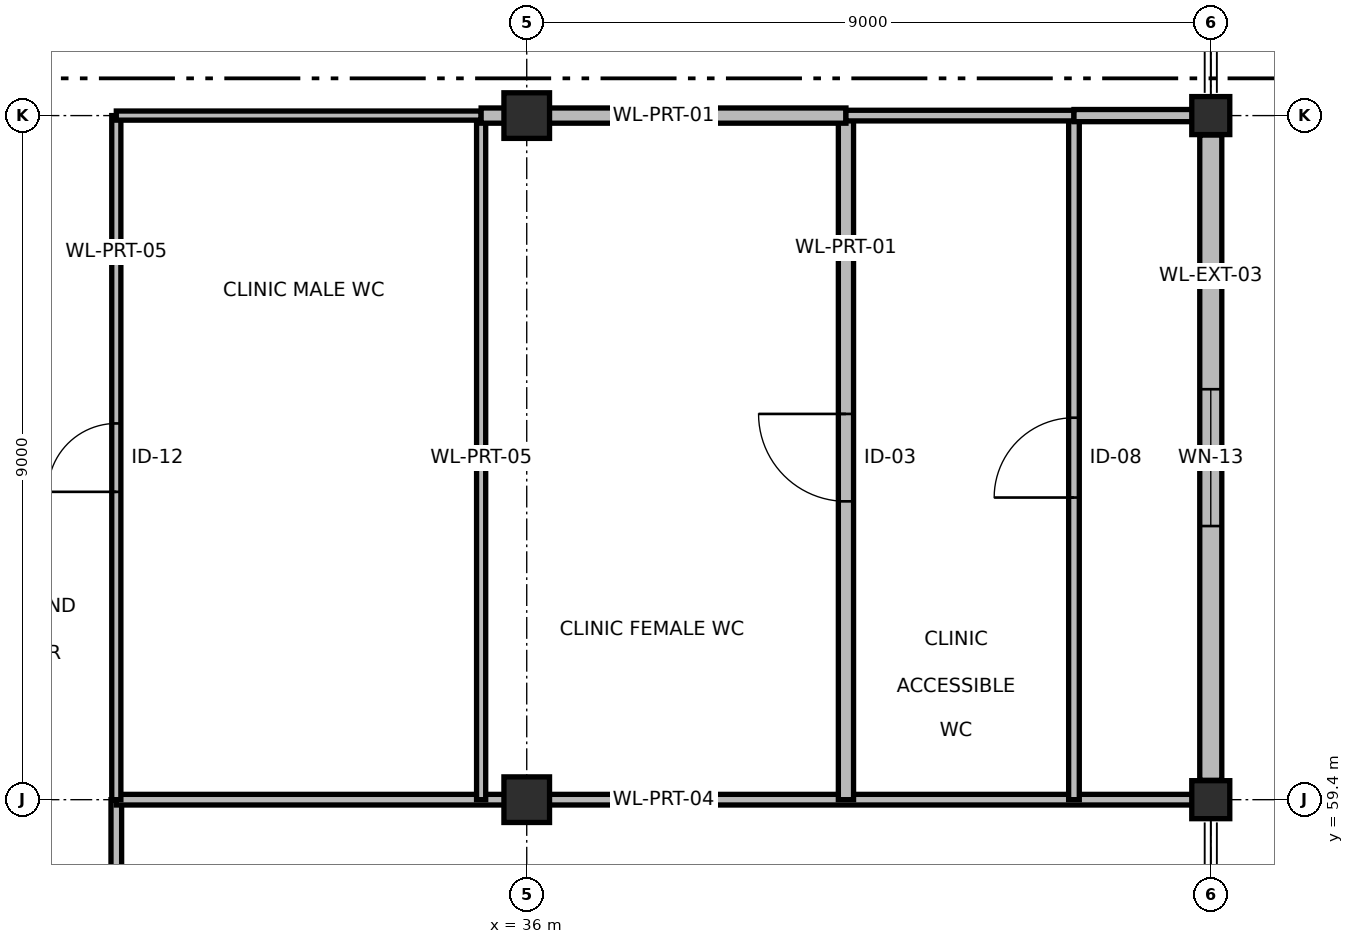
"""IFC4 building model, lengths in metres.
Left out: names, types, materials, properties, quantities, classifications, styles, units other than length and angle.
Written with IfcOpenShell. Run it as: python <this file> out.ifc"""

import sys

from ifc_helpers import new_model, si_unit, direction, frame, frame_2d, origin, origin_2d, place, context, subcontext, project, spatial, rectangle, extrude, element, fill, save


model = new_model("IFC4")
c1 = context("Model", 3, precision=1e-05, world=origin(), true_north=direction((0.0, 1.0)))
c2 = subcontext(c1, "Body", "Model", "MODEL_VIEW")
j1 = project(units=[si_unit("LENGTHUNIT", "METRE"), si_unit("PLANEANGLEUNIT", "RADIAN")], contexts=[c1])
p1 = place(None, origin())
s1 = spatial("IfcSite", under=j1, at=p1, CompositionType="ELEMENT")
p2 = place(p1, origin())
s2 = spatial("IfcBuilding", under=s1, at=p2, CompositionType="ELEMENT")
p3 = place(p2, origin())
s3 = spatial("IfcBuildingStorey", under=s2, at=p3, CompositionType="ELEMENT", Elevation=0.0)
for number, where, z_axis, x_axis in (
    (1, (36.0, 59.4, 0.0), (0.0, 0.0, 1.0), (1.0, 0.0, 0.0)),
    (2, (36.0, 68.4, 0.0), (0.0, 0.0, 1.0), (1.0, 0.0, 0.0)),
):
    element("IfcColumn", number, at=place(p3, frame(where, z_axis=z_axis, x_axis=x_axis)), inside=s3, PredefinedType="COLUMN", context=c2, shape_type="SweptSolid", body=[
        extrude(rectangle(XDim=0.6, YDim=0.6, at=origin_2d()), origin(), (0.0, 0.0, 1.0), 4.8),
    ])
for number, where, z_axis, x_axis in (
    (3, (45.0, 59.4, 0.0), (0.0, 0.0, 1.0), (1.0, 0.0, 0.0)),
    (4, (45.0, 68.4, 0.0), (0.0, 0.0, 1.0), (1.0, 0.0, 0.0)),
):
    element("IfcColumn", number, at=place(p3, frame(where, z_axis=z_axis, x_axis=x_axis)), inside=s3, PredefinedType="COLUMN", context=c2, shape_type="SweptSolid", body=[
        extrude(rectangle(XDim=0.5, YDim=0.5, at=origin_2d()), origin(), (0.0, 0.0, 1.0), 4.8),
    ])
p4 = place(p3, frame((45.0, 68.145, 0.0), z_axis=(0.0, 0.0, 1.0), x_axis=(0.0, -1.0, 0.0)))
e5 = element("IfcWall", 5, at=p4, inside=s3, PredefinedType="SOLIDWALL", context=c2, shape_type="SweptSolid", body=[
    extrude(rectangle(XDim=8.49, YDim=0.29, at=frame_2d((4.245, 0.0))), origin(), (0.0, 0.0, 1.0), 3.785),
])
p5 = place(p4, frame((3.345, 0.0, 0.95)))
e6 = element("IfcOpeningElement", 6, at=p5, cuts=e5, PredefinedType="OPENING", context=c2, shape_type="SweptSolid", body=[
    extrude(rectangle(XDim=1.8, YDim=1.5, at=frame_2d((0.9, 0.75))), frame((0.0, 0.155, 0.0), z_axis=(0.0, -1.0, 0.0), x_axis=(1.0, 0.0, 0.0)), (0.0, 0.0, 1.0), 0.31),
])
p6 = place(p3, frame((30.6, 40.8, 0.0), z_axis=(0.0, 0.0, 1.0), x_axis=(0.0, 1.0, 0.0)))
e7 = element("IfcWall", 7, at=p6, inside=s3, PredefinedType="PARTITIONING", context=c2, shape_type="SweptSolid", body=[
    extrude(rectangle(XDim=18.6, YDim=0.14, at=frame_2d((9.3, 0.0))), origin(), (0.0, 0.0, 1.0), 3.835),
])
p7 = place(p6, frame((12.917, 0.0, 0.0)))
e8 = element("IfcOpeningElement", 8, at=p7, cuts=e7, PredefinedType="OPENING", context=c2, shape_type="SweptSolid", body=[
    extrude(rectangle(XDim=0.95, YDim=2.1, at=frame_2d((0.475, 1.05))), frame((0.0, 0.08, 0.0), z_axis=(0.0, -1.0, 0.0), x_axis=(1.0, 0.0, 0.0)), (0.0, 0.0, 1.0), 0.16),
])
p8 = place(p3, frame((30.6, 59.4, 0.0), z_axis=(0.0, 0.0, 1.0), x_axis=(1.0, 0.0, 0.0)))
e9 = element("IfcWall", 9, at=p8, inside=s3, PredefinedType="PARTITIONING", context=c2, shape_type="SweptSolid", body=[
    extrude(rectangle(XDim=14.4, YDim=0.14, at=frame_2d((7.2, 0.0))), origin(), (0.0, 0.0, 1.0), 3.735),
])
p9 = place(p3, frame((30.6, 59.4, 0.0), z_axis=(0.0, 0.0, 1.0), x_axis=(0.0, 1.0, 0.0)))
e10 = element("IfcWall", 10, at=p9, inside=s3, PredefinedType="PARTITIONING", context=c2, shape_type="SweptSolid", body=[
    extrude(rectangle(XDim=9.0, YDim=0.12, at=frame_2d((4.5, 0.0))), origin(), (0.0, 0.0, 1.0), 3.835),
])
p10 = place(p9, frame((4.05, 0.0, 0.0)))
e11 = element("IfcOpeningElement", 11, at=p10, cuts=e10, PredefinedType="OPENING", context=c2, shape_type="SweptSolid", body=[
    extrude(rectangle(XDim=0.9, YDim=2.1, at=frame_2d((0.45, 1.05))), frame((0.0, 0.07, 0.0), z_axis=(0.0, -1.0, 0.0), x_axis=(1.0, 0.0, 0.0)), (0.0, 0.0, 1.0), 0.14),
])
p11 = place(p3, frame((35.4, 59.4, 0.0), z_axis=(0.0, 0.0, 1.0), x_axis=(0.0, 1.0, 0.0)))
e12 = element("IfcWall", 12, at=p11, inside=s3, PredefinedType="PARTITIONING", context=c2, shape_type="SweptSolid", body=[
    extrude(rectangle(XDim=9.0, YDim=0.12, at=frame_2d((4.5, 0.0))), origin(), (0.0, 0.0, 1.0), 3.835),
])
p12 = place(p3, frame((30.6, 68.4, 0.0), z_axis=(0.0, 0.0, 1.0), x_axis=(1.0, 0.0, 0.0)))
e13 = element("IfcWall", 13, at=p12, inside=s3, PredefinedType="PARTITIONING", context=c2, shape_type="SweptSolid", body=[
    extrude(rectangle(XDim=4.8, YDim=0.12, at=frame_2d((2.4, 0.0))), origin(), (0.0, 0.0, 1.0), 3.835),
])
p13 = place(p3, frame((40.2, 59.4, 0.0), z_axis=(0.0, 0.0, 1.0), x_axis=(0.0, 1.0, 0.0)))
e14 = element("IfcWall", 14, at=p13, inside=s3, PredefinedType="PARTITIONING", context=c2, shape_type="SweptSolid", body=[
    extrude(rectangle(XDim=9.0, YDim=0.2, at=frame_2d((4.5, 0.0))), origin(), (0.0, 0.0, 1.0), 3.835),
])
p14 = place(p13, frame((3.925, 0.0, 0.0)))
e15 = element("IfcOpeningElement", 15, at=p14, cuts=e14, PredefinedType="OPENING", context=c2, shape_type="SweptSolid", body=[
    extrude(rectangle(XDim=1.15, YDim=2.2, at=frame_2d((0.575, 1.1))), frame((0.0, 0.11, 0.0), z_axis=(0.0, -1.0, 0.0), x_axis=(1.0, 0.0, 0.0)), (0.0, 0.0, 1.0), 0.22),
])
p15 = place(p3, frame((35.4, 68.4, 0.0), z_axis=(0.0, 0.0, 1.0), x_axis=(1.0, 0.0, 0.0)))
e16 = element("IfcWall", 16, at=p15, inside=s3, PredefinedType="PARTITIONING", context=c2, shape_type="SweptSolid", body=[
    extrude(rectangle(XDim=4.8, YDim=0.2, at=frame_2d((2.4, 0.0))), origin(), (0.0, 0.0, 1.0), 3.835),
])
p16 = place(p3, frame((43.2, 59.4, 0.0), z_axis=(0.0, 0.0, 1.0), x_axis=(0.0, 1.0, 0.0)))
e17 = element("IfcWall", 17, at=p16, inside=s3, PredefinedType="PARTITIONING", context=c2, shape_type="SweptSolid", body=[
    extrude(rectangle(XDim=9.0, YDim=0.14, at=frame_2d((4.5, 0.0))), origin(), (0.0, 0.0, 1.0), 3.835),
])
p17 = place(p16, frame((3.975, 0.0, 0.0)))
e18 = element("IfcOpeningElement", 18, at=p17, cuts=e17, PredefinedType="OPENING", context=c2, shape_type="SweptSolid", body=[
    extrude(rectangle(XDim=1.05, YDim=2.2, at=frame_2d((0.525, 1.1))), frame((0.0, 0.08, 0.0), z_axis=(0.0, -1.0, 0.0), x_axis=(1.0, 0.0, 0.0)), (0.0, 0.0, 1.0), 0.16),
])
p18 = place(p3, frame((40.2, 68.4, 0.0), z_axis=(0.0, 0.0, 1.0), x_axis=(1.0, 0.0, 0.0)))
e19 = element("IfcWall", 19, at=p18, inside=s3, PredefinedType="PARTITIONING", context=c2, shape_type="SweptSolid", body=[
    extrude(rectangle(XDim=3.0, YDim=0.14, at=frame_2d((1.5, 0.0))), origin(), (0.0, 0.0, 1.0), 3.835),
])
p19 = place(p3, frame((43.2, 68.4, 0.0), z_axis=(0.0, 0.0, 1.0), x_axis=(1.0, 0.0, 0.0)))
e20 = element("IfcWall", 20, at=p19, inside=s3, PredefinedType="PARTITIONING", context=c2, shape_type="SweptSolid", body=[
    extrude(rectangle(XDim=1.8, YDim=0.16, at=frame_2d((0.9, 0.0))), origin(), (0.0, 0.0, 1.0), 3.785),
])
p20 = place(p5, origin())
e21 = element("IfcWindow", 21, at=p20, inside=s3, PartitioningType="SINGLE_PANEL", PredefinedType="WINDOW", context=c2, shape_type="SweptSolid", body=[
    extrude(rectangle(XDim=1.8, YDim=1.5, at=frame_2d((0.9, 0.75))), frame((0.0, 0.03, 0.0), z_axis=(0.0, -1.0, 0.0), x_axis=(1.0, 0.0, 0.0)), (0.0, 0.0, 1.0), 0.06),
])
fill(e6, e21)
p21 = place(p10, origin())
e22 = element("IfcDoor", 22, at=p21, inside=s3, OperationType="SINGLE_SWING_LEFT", PredefinedType="DOOR", context=c2, shape_type="SweptSolid", body=[
    extrude(rectangle(XDim=0.9, YDim=2.1, at=frame_2d((0.45, 1.05))), frame((0.0, 0.025, 0.0), z_axis=(0.0, -1.0, 0.0), x_axis=(1.0, 0.0, 0.0)), (0.0, 0.0, 1.0), 0.05),
])
fill(e11, e22)
p22 = place(p14, origin())
e23 = element("IfcDoor", 23, at=p22, inside=s3, OperationType="SINGLE_SWING_RIGHT", PredefinedType="DOOR", context=c2, shape_type="SweptSolid", body=[
    extrude(rectangle(XDim=1.15, YDim=2.2, at=frame_2d((0.575, 1.1))), frame((0.0, 0.025, 0.0), z_axis=(0.0, -1.0, 0.0), x_axis=(1.0, 0.0, 0.0)), (0.0, 0.0, 1.0), 0.05),
])
fill(e15, e23)
p23 = place(p17, origin())
e24 = element("IfcDoor", 24, at=p23, inside=s3, OperationType="SINGLE_SWING_LEFT", PredefinedType="DOOR", context=c2, shape_type="SweptSolid", body=[
    extrude(rectangle(XDim=1.05, YDim=2.2, at=frame_2d((0.525, 1.1))), frame((0.0, 0.025, 0.0), z_axis=(0.0, -1.0, 0.0), x_axis=(1.0, 0.0, 0.0)), (0.0, 0.0, 1.0), 0.05),
])
fill(e18, e24)
save(model, sys.argv[1])
